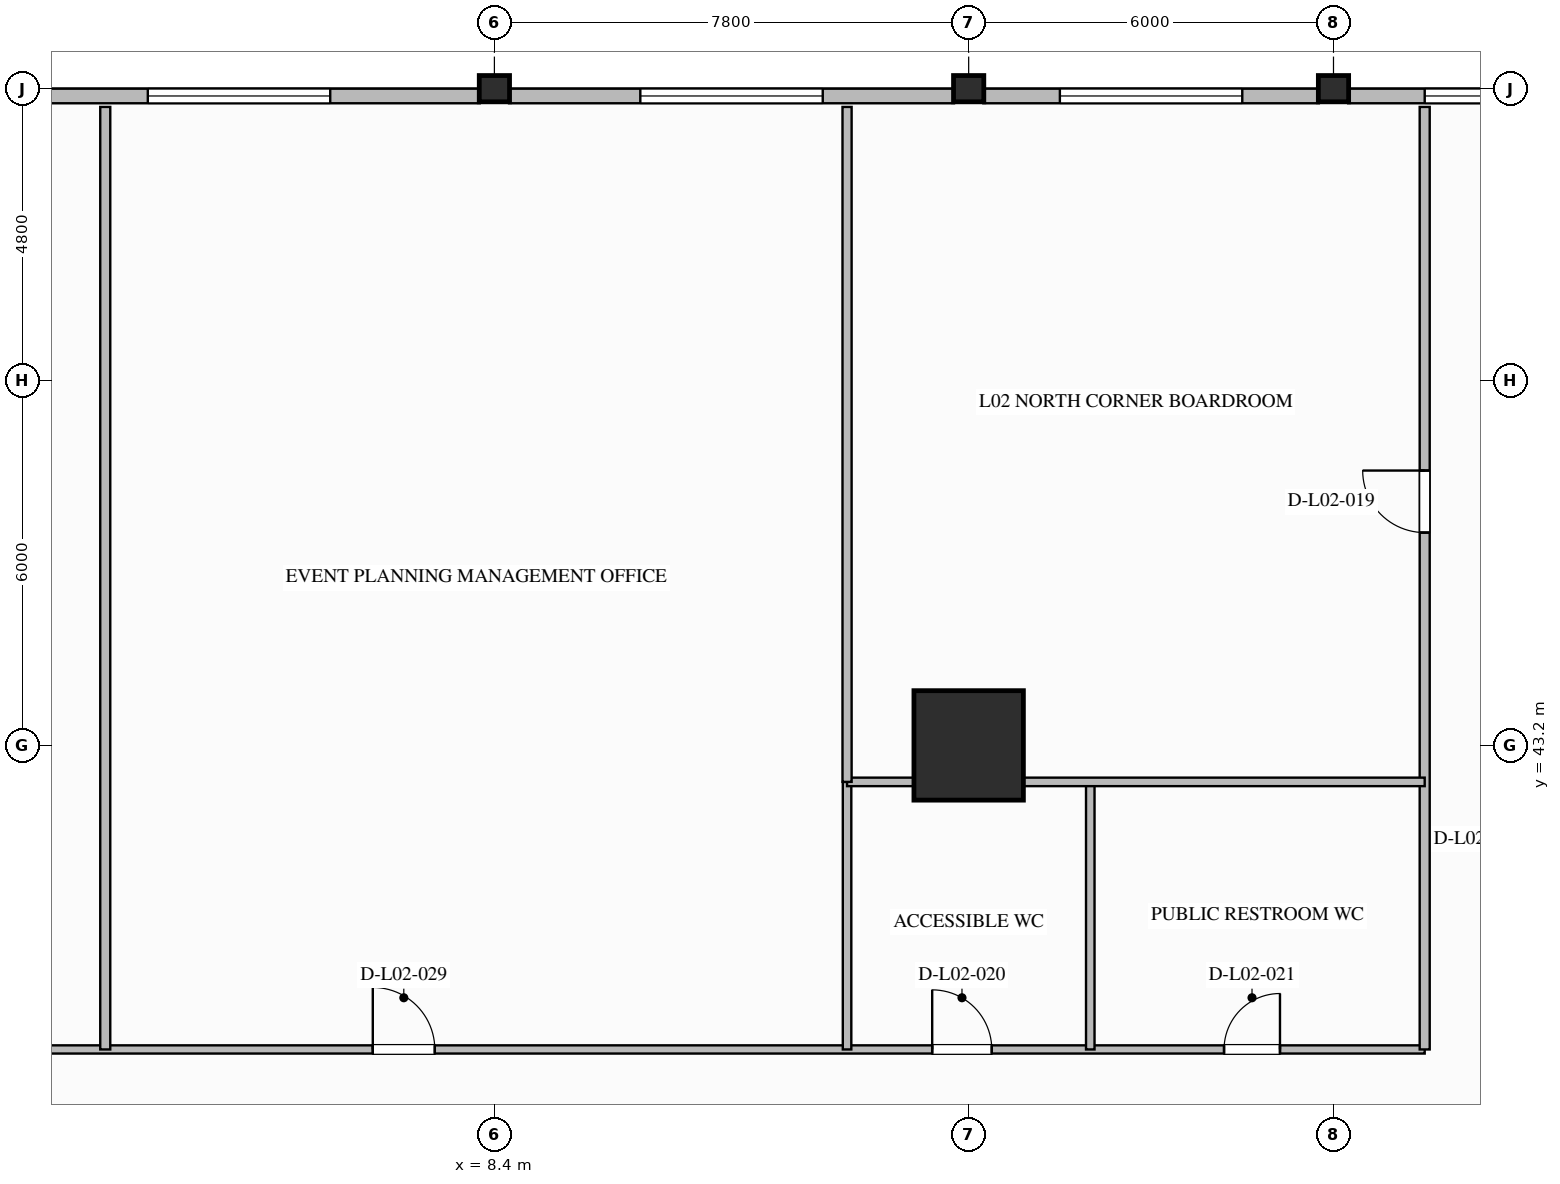
"""IFC4 building model, lengths in metres.
Left out: names, types, materials, properties, quantities, classifications, styles, units other than length and angle.
Written with IfcOpenShell. Run it as: python <this file> out.ifc"""

import sys

from ifc_helpers import new_model, si_unit, direction, frame, frame_2d, origin, origin_2d, place, context, subcontext, project, spatial, rectangle, i_section, extrude, element, fill, save


model = new_model("IFC4")
c1 = context("Model", 3, precision=1e-05, world=origin(), true_north=direction((0.0, 1.0)))
c2 = subcontext(c1, "Body", "Model", "MODEL_VIEW")
j1 = project(units=[si_unit("LENGTHUNIT", "METRE"), si_unit("PLANEANGLEUNIT", "RADIAN")], contexts=[c1])
p1 = place(None, origin())
s1 = spatial("IfcSite", under=j1, at=p1, CompositionType="ELEMENT")
p2 = place(p1, origin())
s2 = spatial("IfcBuilding", under=s1, at=p2, CompositionType="ELEMENT")
p3 = place(p2, frame((0.0, 0.0, 10.8)))
s3 = spatial("IfcBuildingStorey", under=s2, at=p3, CompositionType="ELEMENT", Elevation=10.8)
p4 = place(p3, frame((16.2, 43.2, 0.0), z_axis=(0.0, 0.0, 1.0), x_axis=(1.0, 0.0, 0.0)))
e1 = element("IfcColumn", 1, at=p4, inside=s3, PredefinedType="COLUMN", context=c2, shape_type="SweptSolid", body=[
    extrude(rectangle(XDim=1.8, YDim=1.8, at=origin_2d()), origin(), (0.0, 0.0, 1.0), 6.4),
])
for number, where, z_axis, x_axis in (
    (2, (8.4, 54.0, 0.0), (0.0, 0.0, 1.0), (0.0, 1.0, 0.0)),
    (3, (16.2, 54.0, 0.0), (0.0, 0.0, 1.0), (0.0, 1.0, 0.0)),
    (4, (22.2, 54.0, 0.0), (0.0, 0.0, 1.0), (0.0, 1.0, 0.0)),
):
    element("IfcColumn", number, at=place(p3, frame(where, z_axis=z_axis, x_axis=x_axis)), inside=s3, PredefinedType="COLUMN", context=c2, shape_type="SweptSolid", body=[
        extrude(i_section(OverallWidth=0.432, OverallDepth=0.498, WebThickness=0.056, FlangeThickness=0.089, FilletRadius=0.03, at=origin_2d()), origin(), (0.0, 0.0, 1.0), 6.4),
    ])
p5 = place(p3, frame((0.241, 53.88, 0.0), z_axis=(0.0, 0.0, 1.0), x_axis=(1.0, 0.0, 0.0)))
e5 = element("IfcWall", 5, at=p5, inside=s3, PredefinedType="STANDARD", context=c2, shape_type="SweptSolid", body=[
    extrude(rectangle(XDim=7.918, YDim=0.24, at=frame_2d((3.959, 0.0))), origin(), (0.0, 0.0, 1.0), 5.404),
])
p6 = place(p5, frame((2.459, 0.0, 0.65)))
e6 = element("IfcOpeningElement", 6, at=p6, cuts=e5, PredefinedType="OPENING", context=c2, shape_type="SweptSolid", body=[
    extrude(rectangle(XDim=3.0, YDim=2.2, at=frame_2d((1.5, 1.1))), frame((0.0, 0.13, 0.0), z_axis=(0.0, -1.0, 0.0), x_axis=(1.0, 0.0, 0.0)), (0.0, 0.0, 1.0), 0.26),
])
p7 = place(p3, frame((8.641, 53.88, 0.0), z_axis=(0.0, 0.0, 1.0), x_axis=(1.0, 0.0, 0.0)))
e7 = element("IfcWall", 7, at=p7, inside=s3, PredefinedType="STANDARD", context=c2, shape_type="SweptSolid", body=[
    extrude(rectangle(XDim=7.318, YDim=0.24, at=frame_2d((3.659, 0.0))), origin(), (0.0, 0.0, 1.0), 5.404),
])
p8 = place(p7, frame((2.159, 0.0, 0.65)))
e8 = element("IfcOpeningElement", 8, at=p8, cuts=e7, PredefinedType="OPENING", context=c2, shape_type="SweptSolid", body=[
    extrude(rectangle(XDim=3.0, YDim=2.2, at=frame_2d((1.5, 1.1))), frame((0.0, 0.13, 0.0), z_axis=(0.0, -1.0, 0.0), x_axis=(1.0, 0.0, 0.0)), (0.0, 0.0, 1.0), 0.26),
])
p9 = place(p3, frame((16.441, 53.88, 0.0), z_axis=(0.0, 0.0, 1.0), x_axis=(1.0, 0.0, 0.0)))
e9 = element("IfcWall", 9, at=p9, inside=s3, PredefinedType="STANDARD", context=c2, shape_type="SweptSolid", body=[
    extrude(rectangle(XDim=5.518, YDim=0.24, at=frame_2d((2.759, 0.0))), origin(), (0.0, 0.0, 1.0), 5.404),
])
p10 = place(p9, frame((1.259, 0.0, 0.65)))
e10 = element("IfcOpeningElement", 10, at=p10, cuts=e9, PredefinedType="OPENING", context=c2, shape_type="SweptSolid", body=[
    extrude(rectangle(XDim=3.0, YDim=2.2, at=frame_2d((1.5, 1.1))), frame((0.0, 0.13, 0.0), z_axis=(0.0, -1.0, 0.0), x_axis=(1.0, 0.0, 0.0)), (0.0, 0.0, 1.0), 0.26),
])
p11 = place(p3, frame((22.441, 53.88, 0.0), z_axis=(0.0, 0.0, 1.0), x_axis=(1.0, 0.0, 0.0)))
e11 = element("IfcWall", 11, at=p11, inside=s3, PredefinedType="STANDARD", context=c2, shape_type="SweptSolid", body=[
    extrude(rectangle(XDim=4.318, YDim=0.24, at=frame_2d((2.159, 0.0))), origin(), (0.0, 0.0, 1.0), 5.404),
])
p12 = place(p11, frame((1.259, 0.0, 0.65)))
e12 = element("IfcOpeningElement", 12, at=p12, cuts=e11, PredefinedType="OPENING", context=c2, shape_type="SweptSolid", body=[
    extrude(rectangle(XDim=1.8, YDim=2.2, at=frame_2d((0.9, 1.1))), frame((0.0, 0.13, 0.0), z_axis=(0.0, -1.0, 0.0), x_axis=(1.0, 0.0, 0.0)), (0.0, 0.0, 1.0), 0.26),
])
p13 = place(p3, frame((-23.6, 38.2, 0.0), z_axis=(0.0, 0.0, 1.0), x_axis=(1.0, 0.0, 0.0)))
e13 = element("IfcWall", 13, at=p13, inside=s3, PredefinedType="PARTITIONING", context=c2, shape_type="SweptSolid", body=[
    extrude(rectangle(XDim=47.3, YDim=0.135, at=frame_2d((23.65, 0.0))), origin(), (0.0, 0.0, 1.0), 6.1),
])
p14 = place(p13, frame((39.2, 0.0, 0.0)))
e14 = element("IfcOpeningElement", 14, at=p14, cuts=e13, PredefinedType="OPENING", context=c2, shape_type="SweptSolid", body=[
    extrude(rectangle(XDim=0.98, YDim=2.1, at=frame_2d((0.49, 1.05))), frame((0.0, 0.077, 0.0), z_axis=(0.0, -1.0, 0.0), x_axis=(1.0, 0.0, 0.0)), (0.0, 0.0, 1.0), 0.155),
])
p15 = place(p13, frame((44.0, 0.0, 0.0)))
e15 = element("IfcOpeningElement", 15, at=p15, cuts=e13, PredefinedType="OPENING", context=c2, shape_type="SweptSolid", body=[
    extrude(rectangle(XDim=0.92, YDim=2.1, at=frame_2d((0.46, 1.05))), frame((0.0, 0.077, 0.0), z_axis=(0.0, -1.0, 0.0), x_axis=(1.0, 0.0, 0.0)), (0.0, 0.0, 1.0), 0.155),
])
p16 = place(p13, frame((12.0, 0.0, 0.0)))
e16 = element("IfcOpeningElement", 16, at=p16, cuts=e13, PredefinedType="OPENING", context=c2, shape_type="SweptSolid", body=[
    extrude(rectangle(XDim=1.36, YDim=2.2, at=frame_2d((0.68, 1.1))), frame((0.0, 0.077, 0.0), z_axis=(0.0, -1.0, 0.0), x_axis=(1.0, 0.0, 0.0)), (0.0, 0.0, 1.0), 0.155),
])
p17 = place(p13, frame((30.0, 0.0, 0.0)))
e17 = element("IfcOpeningElement", 17, at=p17, cuts=e13, PredefinedType="OPENING", context=c2, shape_type="SweptSolid", body=[
    extrude(rectangle(XDim=1.02, YDim=2.15, at=frame_2d((0.51, 1.075))), frame((0.0, 0.077, 0.0), z_axis=(0.0, -1.0, 0.0), x_axis=(1.0, 0.0, 0.0)), (0.0, 0.0, 1.0), 0.155),
])
p18 = place(p3, frame((23.7, 38.2, 0.0), z_axis=(0.0, 0.0, 1.0), x_axis=(0.0, 1.0, 0.0)))
e18 = element("IfcWall", 18, at=p18, inside=s3, PredefinedType="PARTITIONING", context=c2, shape_type="SweptSolid", body=[
    extrude(rectangle(XDim=15.5, YDim=0.165, at=frame_2d((7.75, 0.0))), origin(), (0.0, 0.0, 1.0), 6.1),
])
p19 = place(p18, frame((8.5, 0.0, 0.0)))
e19 = element("IfcOpeningElement", 19, at=p19, cuts=e18, PredefinedType="OPENING", context=c2, shape_type="SweptSolid", body=[
    extrude(rectangle(XDim=1.02, YDim=2.15, at=frame_2d((0.51, 1.075))), frame((0.0, 0.093, 0.0), z_axis=(0.0, -1.0, 0.0), x_axis=(1.0, 0.0, 0.0)), (0.0, 0.0, 1.0), 0.185),
])
for number, where, z_axis, x_axis in (
    (20, (14.2, 38.2, 0.0), (0.0, 0.0, 1.0), (0.0, 1.0, 0.0)),
    (21, (18.2, 38.2, 0.0), (0.0, 0.0, 1.0), (0.0, 1.0, 0.0)),
):
    element("IfcWall", number, at=place(p3, frame(where, z_axis=z_axis, x_axis=x_axis)), inside=s3, PredefinedType="PLUMBINGWALL", context=c2, shape_type="SweptSolid", body=[
        extrude(rectangle(XDim=4.4, YDim=0.14, at=frame_2d((2.2, 0.0))), origin(), (0.0, 0.0, 1.0), 6.1),
    ])
p20 = place(p3, frame((14.2, 42.6, 0.0), z_axis=(0.0, 0.0, 1.0), x_axis=(1.0, 0.0, 0.0)))
e22 = element("IfcWall", 22, at=p20, inside=s3, PredefinedType="PLUMBINGWALL", context=c2, shape_type="SweptSolid", body=[
    extrude(rectangle(XDim=9.5, YDim=0.14, at=frame_2d((4.75, 0.0))), origin(), (0.0, 0.0, 1.0), 6.1),
])
p21 = place(p3, frame((14.2, 42.6, 0.0), z_axis=(0.0, 0.0, 1.0), x_axis=(0.0, 1.0, 0.0)))
e23 = element("IfcWall", 23, at=p21, inside=s3, PredefinedType="PARTITIONING", context=c2, shape_type="SweptSolid", body=[
    extrude(rectangle(XDim=11.1, YDim=0.15, at=frame_2d((5.55, 0.0))), origin(), (0.0, 0.0, 1.0), 6.1),
])
p22 = place(p3, frame((2.0, 38.2, 0.0), z_axis=(0.0, 0.0, 1.0), x_axis=(0.0, 1.0, 0.0)))
e24 = element("IfcWall", 24, at=p22, inside=s3, PredefinedType="PARTITIONING", context=c2, shape_type="SweptSolid", body=[
    extrude(rectangle(XDim=15.5, YDim=0.165, at=frame_2d((7.75, 0.0))), origin(), (0.0, 0.0, 1.0), 6.1),
])
p23 = place(p6, origin())
e25 = element("IfcWindow", 25, at=p23, inside=s3, PartitioningType="SINGLE_PANEL", PredefinedType="WINDOW", context=c2, shape_type="SweptSolid", body=[
    extrude(rectangle(XDim=3.0, YDim=2.2, at=frame_2d((1.5, 1.1))), frame((0.0, 0.03, 0.0), z_axis=(0.0, -1.0, 0.0), x_axis=(1.0, 0.0, 0.0)), (0.0, 0.0, 1.0), 0.06),
])
fill(e6, e25)
p24 = place(p8, origin())
e26 = element("IfcWindow", 26, at=p24, inside=s3, PartitioningType="SINGLE_PANEL", PredefinedType="WINDOW", context=c2, shape_type="SweptSolid", body=[
    extrude(rectangle(XDim=3.0, YDim=2.2, at=frame_2d((1.5, 1.1))), frame((0.0, 0.03, 0.0), z_axis=(0.0, -1.0, 0.0), x_axis=(1.0, 0.0, 0.0)), (0.0, 0.0, 1.0), 0.06),
])
fill(e8, e26)
p25 = place(p10, origin())
e27 = element("IfcWindow", 27, at=p25, inside=s3, PartitioningType="SINGLE_PANEL", PredefinedType="WINDOW", context=c2, shape_type="SweptSolid", body=[
    extrude(rectangle(XDim=3.0, YDim=2.2, at=frame_2d((1.5, 1.1))), frame((0.0, 0.03, 0.0), z_axis=(0.0, -1.0, 0.0), x_axis=(1.0, 0.0, 0.0)), (0.0, 0.0, 1.0), 0.06),
])
fill(e10, e27)
p26 = place(p12, origin())
e28 = element("IfcWindow", 28, at=p26, inside=s3, PartitioningType="SINGLE_PANEL", PredefinedType="WINDOW", context=c2, shape_type="SweptSolid", body=[
    extrude(rectangle(XDim=1.8, YDim=2.2, at=frame_2d((0.9, 1.1))), frame((0.0, 0.03, 0.0), z_axis=(0.0, -1.0, 0.0), x_axis=(1.0, 0.0, 0.0)), (0.0, 0.0, 1.0), 0.06),
])
fill(e12, e28)
p27 = place(p19, origin())
e29 = element("IfcDoor", 29, at=p27, inside=s3, OperationType="SINGLE_SWING_RIGHT", PredefinedType="DOOR", context=c2, shape_type="SweptSolid", body=[
    extrude(rectangle(XDim=1.02, YDim=2.15, at=frame_2d((0.51, 1.075))), frame((0.0, 0.025, 0.0), z_axis=(0.0, -1.0, 0.0), x_axis=(1.0, 0.0, 0.0)), (0.0, 0.0, 1.0), 0.05),
])
fill(e19, e29)
p28 = place(p14, origin())
e30 = element("IfcDoor", 30, at=p28, inside=s3, OperationType="SINGLE_SWING_LEFT", PredefinedType="DOOR", context=c2, shape_type="SweptSolid", body=[
    extrude(rectangle(XDim=0.98, YDim=2.1, at=frame_2d((0.49, 1.05))), frame((0.0, 0.025, 0.0), z_axis=(0.0, -1.0, 0.0), x_axis=(1.0, 0.0, 0.0)), (0.0, 0.0, 1.0), 0.05),
])
fill(e14, e30)
p29 = place(p15, origin())
e31 = element("IfcDoor", 31, at=p29, inside=s3, OperationType="SINGLE_SWING_RIGHT", PredefinedType="DOOR", context=c2, shape_type="SweptSolid", body=[
    extrude(rectangle(XDim=0.92, YDim=2.1, at=frame_2d((0.46, 1.05))), frame((0.0, 0.025, 0.0), z_axis=(0.0, -1.0, 0.0), x_axis=(1.0, 0.0, 0.0)), (0.0, 0.0, 1.0), 0.05),
])
fill(e15, e31)
p30 = place(p17, origin())
e32 = element("IfcDoor", 32, at=p30, inside=s3, OperationType="SINGLE_SWING_LEFT", PredefinedType="DOOR", context=c2, shape_type="SweptSolid", body=[
    extrude(rectangle(XDim=1.02, YDim=2.15, at=frame_2d((0.51, 1.075))), frame((0.0, 0.025, 0.0), z_axis=(0.0, -1.0, 0.0), x_axis=(1.0, 0.0, 0.0)), (0.0, 0.0, 1.0), 0.05),
])
fill(e17, e32)
save(model, sys.argv[1])
